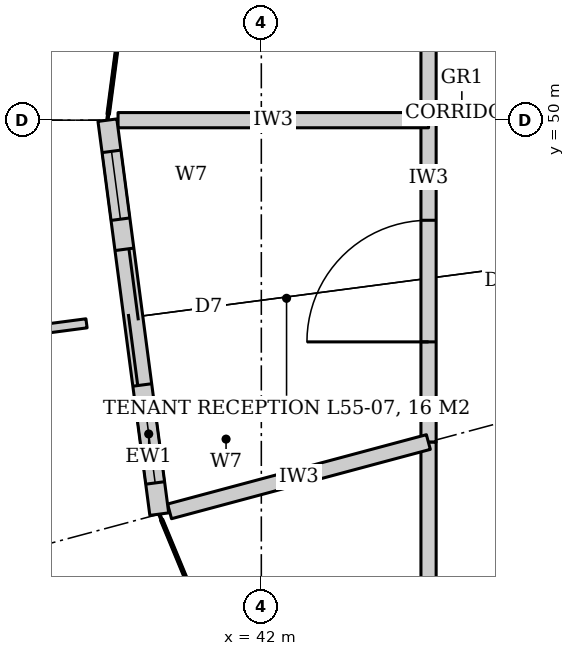
"""IFC4 building model, lengths in metres.
Left out: names, types, materials, properties, quantities, classifications, styles, units other than length and angle.
Written with IfcOpenShell. Run it as: python <this file> out.ifc"""

import sys

from ifc_helpers import new_model, si_unit, direction, frame, frame_2d, origin, place, context, subcontext, project, spatial, rectangle, extrude, element, fill, save


model = new_model("IFC4")
c1 = context("Model", 3, precision=1e-05, world=origin(), true_north=direction((0.0, 1.0)))
c2 = subcontext(c1, "Body", "Model", "MODEL_VIEW")
j1 = project(units=[si_unit("LENGTHUNIT", "METRE"), si_unit("PLANEANGLEUNIT", "RADIAN")], contexts=[c1])
p1 = place(None, origin())
s1 = spatial("IfcSite", under=j1, at=p1, CompositionType="ELEMENT")
p2 = place(p1, origin())
s2 = spatial("IfcBuilding", under=s1, at=p2, CompositionType="ELEMENT")
p3 = place(p2, frame((0.0, 0.0, 240.2)))
s3 = spatial("IfcBuildingStorey", under=s2, at=p3, CompositionType="ELEMENT", Elevation=240.2)
p4 = place(p3, frame((44.2, 40.878, 0.0), z_axis=(0.0, 0.0, 1.0), x_axis=(0.0, 1.0, 0.0)))
e1 = element("IfcWall", 1, at=p4, inside=s3, PredefinedType="PARTITIONING", context=c2, shape_type="SweptSolid", body=[
    extrude(rectangle(XDim=4.888, YDim=0.2, at=frame_2d((2.444, 0.0))), origin(), (0.0, 0.0, 1.0), 3.02),
])
p5 = place(p4, frame((1.994, 0.0, 0.0)))
e2 = element("IfcOpeningElement", 2, at=p5, cuts=e1, PredefinedType="OPENING", context=c2, shape_type="SweptSolid", body=[
    extrude(rectangle(XDim=0.9, YDim=2.4, at=frame_2d((0.45, 1.2))), frame((0.0, 0.11, 0.0), z_axis=(0.0, -1.0, 0.0), x_axis=(1.0, 0.0, 0.0)), (0.0, 0.0, 1.0), 0.22),
])
p6 = place(p3, frame((44.2, 45.766, 0.0), z_axis=(0.0, 0.0, 1.0), x_axis=(0.0, 1.0, 0.0)))
e3 = element("IfcWall", 3, at=p6, inside=s3, PredefinedType="PARTITIONING", context=c2, shape_type="SweptSolid", body=[
    extrude(rectangle(XDim=4.234, YDim=0.2, at=frame_2d((2.117, 0.0))), origin(), (0.0, 0.0, 1.0), 3.02),
])
p7 = place(p6, frame((1.317, 0.0, 0.0)))
e4 = element("IfcOpeningElement", 4, at=p7, cuts=e3, PredefinedType="OPENING", context=c2, shape_type="SweptSolid", body=[
    extrude(rectangle(XDim=1.6, YDim=2.4, at=frame_2d((0.8, 1.2))), frame((0.0, 0.11, 0.0), z_axis=(0.0, -1.0, 0.0), x_axis=(1.0, 0.0, 0.0)), (0.0, 0.0, 1.0), 0.22),
])
p8 = place(p3, frame((44.2, 50.0, 0.0), z_axis=(0.0, 0.0, 1.0), x_axis=(0.0, 1.0, 0.0)))
e5 = element("IfcWall", 5, at=p8, inside=s3, PredefinedType="PARTITIONING", context=c2, shape_type="SweptSolid", body=[
    extrude(rectangle(XDim=8.8, YDim=0.2, at=frame_2d((4.4, 0.0))), origin(), (0.0, 0.0, 1.0), 3.02),
])
p9 = place(p3, frame((44.2, 50.0, 0.0), z_axis=(0.0, 0.0, 1.0), x_axis=(-1.0, 0.0, 0.0)))
e6 = element("IfcWall", 6, at=p9, inside=s3, PredefinedType="PARTITIONING", context=c2, shape_type="SweptSolid", body=[
    extrude(rectangle(XDim=4.085, YDim=0.2, at=frame_2d((2.042, 0.0))), origin(), (0.0, 0.0, 1.0), 3.02),
])
p10 = place(p3, frame((44.198, 45.766, 0.0), z_axis=(0.0, 0.0, 1.0), x_axis=(-0.965944651358, -0.258748778768, 0.0)))
e7 = element("IfcWall", 7, at=p10, inside=s3, PredefinedType="PARTITIONING", context=c2, shape_type="SweptSolid", body=[
    extrude(rectangle(XDim=3.525, YDim=0.2, at=frame_2d((1.763, 0.0))), origin(), (0.0, 0.0, 1.0), 3.02),
])
p11 = place(p3, frame((39.975, 50.0, 0.0), z_axis=(0.0, 0.0, 1.0), x_axis=(0.130487131216, -0.99145000307, 0.0)))
e8 = element("IfcWall", 8, at=p11, inside=s3, PredefinedType="SOLIDWALL", context=c2, shape_type="SweptSolid", body=[
    extrude(rectangle(XDim=5.228, YDim=0.25, at=frame_2d((2.614, 0.0))), origin(), (0.0, 0.0, 1.0), 4.04),
])
p12 = place(p11, frame((1.714, 0.0, 0.0)))
e9 = element("IfcOpeningElement", 9, at=p12, cuts=e8, PredefinedType="OPENING", context=c2, shape_type="SweptSolid", body=[
    extrude(rectangle(XDim=1.8, YDim=2.4, at=frame_2d((0.9, 1.2))), frame((0.0, 0.135, 0.0), z_axis=(0.0, -1.0, 0.0), x_axis=(1.0, 0.0, 0.0)), (0.0, 0.0, 1.0), 0.27),
])
p13 = place(p11, frame((0.414, 0.0, 0.0)))
e10 = element("IfcOpeningElement", 10, at=p13, cuts=e8, PredefinedType="OPENING", context=c2, shape_type="SweptSolid", body=[
    extrude(rectangle(XDim=0.9, YDim=2.4, at=frame_2d((0.45, 1.2))), frame((0.0, 0.135, 0.0), z_axis=(0.0, -1.0, 0.0), x_axis=(1.0, 0.0, 0.0)), (0.0, 0.0, 1.0), 0.27),
])
p14 = place(p11, frame((3.914, 0.0, 0.0)))
e11 = element("IfcOpeningElement", 11, at=p14, cuts=e8, PredefinedType="OPENING", context=c2, shape_type="SweptSolid", body=[
    extrude(rectangle(XDim=0.9, YDim=2.4, at=frame_2d((0.45, 1.2))), frame((0.0, 0.135, 0.0), z_axis=(0.0, -1.0, 0.0), x_axis=(1.0, 0.0, 0.0)), (0.0, 0.0, 1.0), 0.27),
])
p15 = place(p7, origin())
e12 = element("IfcDoor", 12, at=p15, inside=s3, OperationType="DOUBLE_DOOR_DOUBLE_SWING", PredefinedType="DOOR", context=c2, shape_type="SweptSolid", body=[
    extrude(rectangle(XDim=1.6, YDim=2.4, at=frame_2d((0.8, 1.2))), frame((0.0, 0.025, 0.0), z_axis=(0.0, -1.0, 0.0), x_axis=(1.0, 0.0, 0.0)), (0.0, 0.0, 1.0), 0.05),
])
fill(e4, e12)
p16 = place(p12, origin())
e13 = element("IfcDoor", 13, at=p16, inside=s3, OperationType="DOUBLE_DOOR_SLIDING", PredefinedType="DOOR", context=c2, shape_type="SweptSolid", body=[
    extrude(rectangle(XDim=1.8, YDim=2.4, at=frame_2d((0.9, 1.2))), frame((0.0, 0.025, 0.0), z_axis=(0.0, -1.0, 0.0), x_axis=(1.0, 0.0, 0.0)), (0.0, 0.0, 1.0), 0.05),
])
fill(e9, e13)
p17 = place(p13, origin())
e14 = element("IfcWindow", 14, at=p17, inside=s3, PartitioningType="SINGLE_PANEL", PredefinedType="WINDOW", context=c2, shape_type="SweptSolid", body=[
    extrude(rectangle(XDim=0.9, YDim=2.4, at=frame_2d((0.45, 1.2))), frame((0.0, 0.03, 0.0), z_axis=(0.0, -1.0, 0.0), x_axis=(1.0, 0.0, 0.0)), (0.0, 0.0, 1.0), 0.06),
])
fill(e10, e14)
p18 = place(p14, origin())
e15 = element("IfcWindow", 15, at=p18, inside=s3, PartitioningType="SINGLE_PANEL", PredefinedType="WINDOW", context=c2, shape_type="SweptSolid", body=[
    extrude(rectangle(XDim=0.9, YDim=2.4, at=frame_2d((0.45, 1.2))), frame((0.0, 0.03, 0.0), z_axis=(0.0, -1.0, 0.0), x_axis=(1.0, 0.0, 0.0)), (0.0, 0.0, 1.0), 0.06),
])
fill(e11, e15)
save(model, sys.argv[1])
